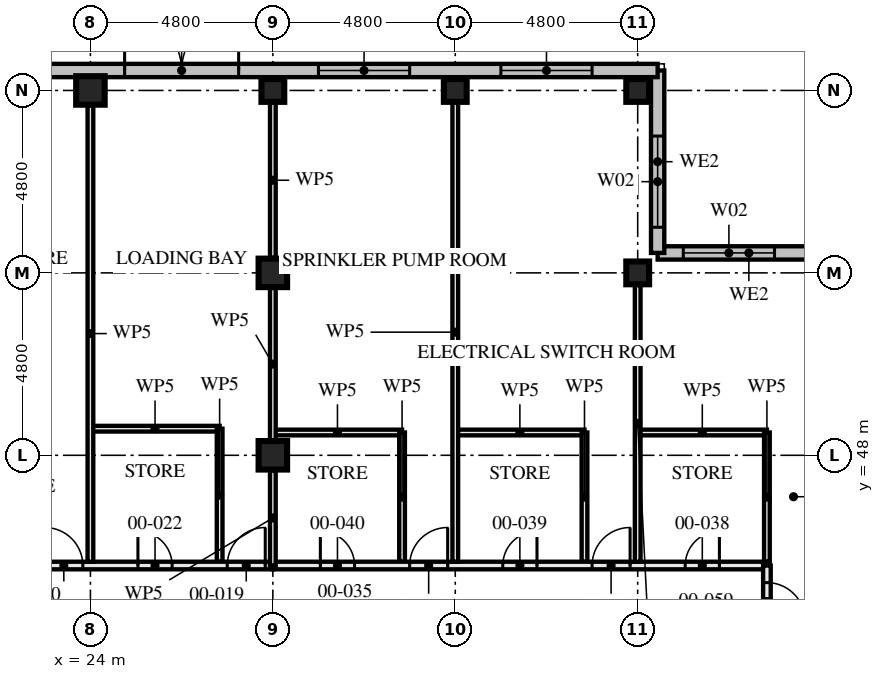
"""IFC4 building model, lengths in metres.
Left out: names, types, materials, properties, quantities, classifications, styles, units other than length and angle.
Written with IfcOpenShell. Run it as: python <this file> out.ifc"""

import sys

from ifc_helpers import new_model, si_unit, direction, frame, frame_2d, origin, origin_2d, place, context, subcontext, project, spatial, rectangle, hollow_rectangle, extrude, element, fill, save


model = new_model("IFC4")
c1 = context("Model", 3, precision=1e-05, world=origin(), true_north=direction((0.0, 1.0)))
c2 = subcontext(c1, "Body", "Model", "MODEL_VIEW")
j1 = project(units=[si_unit("LENGTHUNIT", "METRE"), si_unit("PLANEANGLEUNIT", "RADIAN")], contexts=[c1])
p1 = place(None, origin())
s1 = spatial("IfcSite", under=j1, at=p1, CompositionType="ELEMENT")
p2 = place(p1, origin())
s2 = spatial("IfcBuilding", under=s1, at=p2, CompositionType="ELEMENT")
p3 = place(p2, origin())
s3 = spatial("IfcBuildingStorey", under=s2, at=p3, CompositionType="ELEMENT", Elevation=0.0)
for number, where, z_axis, x_axis in (
    (1, (24.0, 57.6, 0.0), (0.0, 0.0, 1.0), (0.0, 1.0, 0.0)),
    (2, (28.8, 48.0, 0.0), (0.0, 0.0, 1.0), (1.0, 0.0, 0.0)),
    (3, (28.8, 52.8, 0.0), (0.0, 0.0, 1.0), (1.0, 0.0, 0.0)),
):
    element("IfcColumn", number, at=place(p3, frame(where, z_axis=z_axis, x_axis=x_axis)), inside=s3, PredefinedType="COLUMN", context=c2, shape_type="SweptSolid", body=[
        extrude(hollow_rectangle(XDim=0.75, YDim=0.75, WallThickness=0.08, at=origin_2d()), origin(), (0.0, 0.0, 1.0), 4.5),
    ])
for number, where, z_axis, x_axis in (
    (4, (28.8, 57.6, 0.0), (0.0, 0.0, 1.0), (0.0, 1.0, 0.0)),
    (5, (33.6, 57.6, 0.0), (0.0, 0.0, 1.0), (0.0, 1.0, 0.0)),
):
    element("IfcColumn", number, at=place(p3, frame(where, z_axis=z_axis, x_axis=x_axis)), inside=s3, PredefinedType="COLUMN", context=c2, shape_type="SweptSolid", body=[
        extrude(hollow_rectangle(XDim=0.6, YDim=0.6, WallThickness=0.08, at=origin_2d()), origin(), (0.0, 0.0, 1.0), 4.5),
    ])
for number, where, z_axis, x_axis in (
    (6, (38.4, 52.8, 0.0), (0.0, 0.0, 1.0), (0.0, 1.0, 0.0)),
    (7, (38.4, 57.6, 0.0), (0.0, 0.0, 1.0), (0.0, 1.0, 0.0)),
):
    element("IfcColumn", number, at=place(p3, frame(where, z_axis=z_axis, x_axis=x_axis)), inside=s3, PredefinedType="COLUMN", context=c2, shape_type="SweptSolid", body=[
        extrude(hollow_rectangle(XDim=0.6, YDim=0.6, WallThickness=0.06, at=origin_2d()), origin(), (0.0, 0.0, 1.0), 4.5),
    ])
p4 = place(p3, frame((43.725, 53.325, 0.0), z_axis=(0.0, 0.0, 1.0), x_axis=(-1.0, 0.0, 0.0)))
e8 = element("IfcWall", 8, at=p4, inside=s3, PredefinedType="SOLIDWALL", context=c2, shape_type="SweptSolid", body=[
    extrude(rectangle(XDim=4.8, YDim=0.35, at=frame_2d((2.4, 0.0))), origin(), (0.0, 0.0, 1.0), 4.5),
])
p5 = place(p4, frame((1.725, 0.0, 0.9)))
e9 = element("IfcOpeningElement", 9, at=p5, cuts=e8, PredefinedType="OPENING", context=c2, shape_type="SweptSolid", body=[
    extrude(rectangle(XDim=2.4, YDim=2.4, at=frame_2d((1.2, 1.2))), frame((0.0, 0.186, 0.0), z_axis=(0.0, -1.0, 0.0), x_axis=(1.0, 0.0, 0.0)), (0.0, 0.0, 1.0), 0.371),
])
p6 = place(p3, frame((38.925, 53.325, 0.0), z_axis=(0.0, 0.0, 1.0), x_axis=(0.0, 1.0, 0.0)))
e10 = element("IfcWall", 10, at=p6, inside=s3, PredefinedType="SOLIDWALL", context=c2, shape_type="SweptSolid", body=[
    extrude(rectangle(XDim=4.8, YDim=0.35, at=frame_2d((2.4, 0.0))), origin(), (0.0, 0.0, 1.0), 4.5),
])
p7 = place(p6, frame((0.675, 0.0, 0.9)))
e11 = element("IfcOpeningElement", 11, at=p7, cuts=e10, PredefinedType="OPENING", context=c2, shape_type="SweptSolid", body=[
    extrude(rectangle(XDim=2.4, YDim=2.4, at=frame_2d((1.2, 1.2))), frame((0.0, 0.186, 0.0), z_axis=(0.0, -1.0, 0.0), x_axis=(1.0, 0.0, 0.0)), (0.0, 0.0, 1.0), 0.371),
])
p8 = place(p3, frame((38.925, 58.125, 0.0), z_axis=(0.0, 0.0, 1.0), x_axis=(-1.0, 0.0, 0.0)))
e12 = element("IfcWall", 12, at=p8, inside=s3, PredefinedType="SOLIDWALL", context=c2, shape_type="SweptSolid", body=[
    extrude(rectangle(XDim=34.65, YDim=0.35, at=frame_2d((17.325, 0.0))), origin(), (0.0, 0.0, 1.0), 4.5),
])
p9 = place(p8, frame((11.025, 0.0, 0.0)))
e13 = element("IfcOpeningElement", 13, at=p9, cuts=e12, PredefinedType="OPENING", context=c2, shape_type="SweptSolid", body=[
    extrude(rectangle(XDim=3.0, YDim=3.6, at=frame_2d((1.5, 1.8))), frame((0.0, 0.186, 0.0), z_axis=(0.0, -1.0, 0.0), x_axis=(1.0, 0.0, 0.0)), (0.0, 0.0, 1.0), 0.371),
])
p10 = place(p8, frame((30.525, 0.0, 0.9)))
e14 = element("IfcOpeningElement", 14, at=p10, cuts=e12, PredefinedType="OPENING", context=c2, shape_type="SweptSolid", body=[
    extrude(rectangle(XDim=2.4, YDim=2.4, at=frame_2d((1.2, 1.2))), frame((0.0, 0.186, 0.0), z_axis=(0.0, -1.0, 0.0), x_axis=(1.0, 0.0, 0.0)), (0.0, 0.0, 1.0), 0.371),
])
p11 = place(p8, frame((25.725, 0.0, 0.9)))
e15 = element("IfcOpeningElement", 15, at=p11, cuts=e12, PredefinedType="OPENING", context=c2, shape_type="SweptSolid", body=[
    extrude(rectangle(XDim=2.4, YDim=2.4, at=frame_2d((1.2, 1.2))), frame((0.0, 0.186, 0.0), z_axis=(0.0, -1.0, 0.0), x_axis=(1.0, 0.0, 0.0)), (0.0, 0.0, 1.0), 0.371),
])
p12 = place(p8, frame((20.925, 0.0, 0.9)))
e16 = element("IfcOpeningElement", 16, at=p12, cuts=e12, PredefinedType="OPENING", context=c2, shape_type="SweptSolid", body=[
    extrude(rectangle(XDim=2.4, YDim=2.4, at=frame_2d((1.2, 1.2))), frame((0.0, 0.186, 0.0), z_axis=(0.0, -1.0, 0.0), x_axis=(1.0, 0.0, 0.0)), (0.0, 0.0, 1.0), 0.371),
])
p13 = place(p8, frame((16.125, 0.0, 0.9)))
e17 = element("IfcOpeningElement", 17, at=p13, cuts=e12, PredefinedType="OPENING", context=c2, shape_type="SweptSolid", body=[
    extrude(rectangle(XDim=2.4, YDim=2.4, at=frame_2d((1.2, 1.2))), frame((0.0, 0.186, 0.0), z_axis=(0.0, -1.0, 0.0), x_axis=(1.0, 0.0, 0.0)), (0.0, 0.0, 1.0), 0.371),
])
p14 = place(p8, frame((6.525, 0.0, 0.9)))
e18 = element("IfcOpeningElement", 18, at=p14, cuts=e12, PredefinedType="OPENING", context=c2, shape_type="SweptSolid", body=[
    extrude(rectangle(XDim=2.4, YDim=2.4, at=frame_2d((1.2, 1.2))), frame((0.0, 0.186, 0.0), z_axis=(0.0, -1.0, 0.0), x_axis=(1.0, 0.0, 0.0)), (0.0, 0.0, 1.0), 0.371),
])
p15 = place(p8, frame((1.725, 0.0, 0.9)))
e19 = element("IfcOpeningElement", 19, at=p15, cuts=e12, PredefinedType="OPENING", context=c2, shape_type="SweptSolid", body=[
    extrude(rectangle(XDim=2.4, YDim=2.4, at=frame_2d((1.2, 1.2))), frame((0.0, 0.186, 0.0), z_axis=(0.0, -1.0, 0.0), x_axis=(1.0, 0.0, 0.0)), (0.0, 0.0, 1.0), 0.371),
])
p16 = place(p3, frame((27.4, 48.7, 0.0), z_axis=(0.0, 0.0, 1.0), x_axis=(0.0, -1.0, 0.0)))
e20 = element("IfcWall", 20, at=p16, inside=s3, PredefinedType="PARTITIONING", context=c2, shape_type="SweptSolid", body=[
    extrude(rectangle(XDim=3.5, YDim=0.15, at=frame_2d((1.75, 0.0))), origin(), (0.0, 0.0, 1.0), 3.55),
])
p17 = place(p3, frame((27.4, 48.7, 0.0), z_axis=(0.0, 0.0, 1.0), x_axis=(-1.0, 0.0, 0.0)))
e21 = element("IfcWall", 21, at=p17, inside=s3, PredefinedType="PARTITIONING", context=c2, shape_type="SweptSolid", body=[
    extrude(rectangle(XDim=3.4, YDim=0.15, at=frame_2d((1.7, 0.0))), origin(), (0.0, 0.0, 1.0), 4.33),
])
p18 = place(p3, frame((24.0, 57.205, 0.0), z_axis=(0.0, 0.0, 1.0), x_axis=(0.0, -1.0, 0.0)))
e22 = element("IfcWall", 22, at=p18, inside=s3, PredefinedType="PARTITIONING", context=c2, shape_type="SweptSolid", body=[
    extrude(rectangle(XDim=12.005, YDim=0.15, at=frame_2d((6.002, 0.0))), origin(), (0.0, 0.0, 1.0), 3.55),
])
p19 = place(p3, frame((28.8, 45.1, 0.0), z_axis=(0.0, 0.0, 1.0), x_axis=(-1.0, 0.0, 0.0)))
e23 = element("IfcWall", 23, at=p19, inside=s3, PredefinedType="PARTITIONING", context=c2, shape_type="SweptSolid", body=[
    extrude(rectangle(XDim=14.4, YDim=0.2, at=frame_2d((7.2, 0.0))), origin(), (0.0, 0.0, 1.0), 4.33),
])
p20 = place(p19, frame((0.2, 0.0, 0.0)))
e24 = element("IfcOpeningElement", 24, at=p20, cuts=e23, PredefinedType="OPENING", context=c2, shape_type="SweptSolid", body=[
    extrude(rectangle(XDim=1.0, YDim=2.4, at=frame_2d((0.5, 1.2))), frame((0.0, 0.111, 0.0), z_axis=(0.0, -1.0, 0.0), x_axis=(1.0, 0.0, 0.0)), (0.0, 0.0, 1.0), 0.221),
])
p21 = place(p19, frame((5.0, 0.0, 0.0)))
e25 = element("IfcOpeningElement", 25, at=p21, cuts=e23, PredefinedType="OPENING", context=c2, shape_type="SweptSolid", body=[
    extrude(rectangle(XDim=1.0, YDim=2.4, at=frame_2d((0.5, 1.2))), frame((0.0, 0.111, 0.0), z_axis=(0.0, -1.0, 0.0), x_axis=(1.0, 0.0, 0.0)), (0.0, 0.0, 1.0), 0.221),
])
p22 = place(p19, frame((9.8, 0.0, 0.0)))
e26 = element("IfcOpeningElement", 26, at=p22, cuts=e23, PredefinedType="OPENING", context=c2, shape_type="SweptSolid", body=[
    extrude(rectangle(XDim=1.0, YDim=2.4, at=frame_2d((0.5, 1.2))), frame((0.0, 0.111, 0.0), z_axis=(0.0, -1.0, 0.0), x_axis=(1.0, 0.0, 0.0)), (0.0, 0.0, 1.0), 0.221),
])
p23 = place(p19, frame((2.65, 0.0, 0.0)))
e27 = element("IfcOpeningElement", 27, at=p23, cuts=e23, PredefinedType="OPENING", context=c2, shape_type="SweptSolid", body=[
    extrude(rectangle(XDim=0.9, YDim=2.1, at=frame_2d((0.45, 1.05))), frame((0.0, 0.111, 0.0), z_axis=(0.0, -1.0, 0.0), x_axis=(1.0, 0.0, 0.0)), (0.0, 0.0, 1.0), 0.221),
])
p24 = place(p19, frame((7.45, 0.0, 0.0)))
e28 = element("IfcOpeningElement", 28, at=p24, cuts=e23, PredefinedType="OPENING", context=c2, shape_type="SweptSolid", body=[
    extrude(rectangle(XDim=0.9, YDim=2.1, at=frame_2d((0.45, 1.05))), frame((0.0, 0.111, 0.0), z_axis=(0.0, -1.0, 0.0), x_axis=(1.0, 0.0, 0.0)), (0.0, 0.0, 1.0), 0.221),
])
p25 = place(p19, frame((12.25, 0.0, 0.0)))
e29 = element("IfcOpeningElement", 29, at=p25, cuts=e23, PredefinedType="OPENING", context=c2, shape_type="SweptSolid", body=[
    extrude(rectangle(XDim=0.9, YDim=2.1, at=frame_2d((0.45, 1.05))), frame((0.0, 0.111, 0.0), z_axis=(0.0, -1.0, 0.0), x_axis=(1.0, 0.0, 0.0)), (0.0, 0.0, 1.0), 0.221),
])
p26 = place(p3, frame((41.8, 48.6, 0.0), z_axis=(0.0, 0.0, 1.0), x_axis=(0.0, -1.0, 0.0)))
e30 = element("IfcWall", 30, at=p26, inside=s3, PredefinedType="PARTITIONING", context=c2, shape_type="SweptSolid", body=[
    extrude(rectangle(XDim=3.4, YDim=0.15, at=frame_2d((1.7, 0.0))), origin(), (0.0, 0.0, 1.0), 3.55),
])
p27 = place(p3, frame((41.8, 48.6, 0.0), z_axis=(0.0, 0.0, 1.0), x_axis=(-1.0, 0.0, 0.0)))
e31 = element("IfcWall", 31, at=p27, inside=s3, PredefinedType="PARTITIONING", context=c2, shape_type="SweptSolid", body=[
    extrude(rectangle(XDim=3.4, YDim=0.15, at=frame_2d((1.7, 0.0))), origin(), (0.0, 0.0, 1.0), 4.33),
])
p28 = place(p3, frame((37.0, 48.6, 0.0), z_axis=(0.0, 0.0, 1.0), x_axis=(0.0, -1.0, 0.0)))
e32 = element("IfcWall", 32, at=p28, inside=s3, PredefinedType="PARTITIONING", context=c2, shape_type="SweptSolid", body=[
    extrude(rectangle(XDim=3.4, YDim=0.15, at=frame_2d((1.7, 0.0))), origin(), (0.0, 0.0, 1.0), 3.55),
])
p29 = place(p3, frame((37.0, 48.6, 0.0), z_axis=(0.0, 0.0, 1.0), x_axis=(-1.0, 0.0, 0.0)))
e33 = element("IfcWall", 33, at=p29, inside=s3, PredefinedType="PARTITIONING", context=c2, shape_type="SweptSolid", body=[
    extrude(rectangle(XDim=3.4, YDim=0.15, at=frame_2d((1.7, 0.0))), origin(), (0.0, 0.0, 1.0), 4.33),
])
p30 = place(p3, frame((32.2, 48.6, 0.0), z_axis=(0.0, 0.0, 1.0), x_axis=(0.0, -1.0, 0.0)))
e34 = element("IfcWall", 34, at=p30, inside=s3, PredefinedType="PARTITIONING", context=c2, shape_type="SweptSolid", body=[
    extrude(rectangle(XDim=3.4, YDim=0.15, at=frame_2d((1.7, 0.0))), origin(), (0.0, 0.0, 1.0), 3.55),
])
p31 = place(p3, frame((32.2, 48.6, 0.0), z_axis=(0.0, 0.0, 1.0), x_axis=(-1.0, 0.0, 0.0)))
e35 = element("IfcWall", 35, at=p31, inside=s3, PredefinedType="PARTITIONING", context=c2, shape_type="SweptSolid", body=[
    extrude(rectangle(XDim=3.4, YDim=0.15, at=frame_2d((1.7, 0.0))), origin(), (0.0, 0.0, 1.0), 4.33),
])
p32 = place(p3, frame((38.4, 52.48, 0.0), z_axis=(0.0, 0.0, 1.0), x_axis=(0.0, -1.0, 0.0)))
e36 = element("IfcWall", 36, at=p32, inside=s3, PredefinedType="PARTITIONING", context=c2, shape_type="SweptSolid", body=[
    extrude(rectangle(XDim=7.28, YDim=0.15, at=frame_2d((3.64, 0.0))), origin(), (0.0, 0.0, 1.0), 3.55),
])
p33 = place(p3, frame((33.6, 57.28, 0.0), z_axis=(0.0, 0.0, 1.0), x_axis=(0.0, -1.0, 0.0)))
e37 = element("IfcWall", 37, at=p33, inside=s3, PredefinedType="PARTITIONING", context=c2, shape_type="SweptSolid", body=[
    extrude(rectangle(XDim=12.08, YDim=0.15, at=frame_2d((6.04, 0.0))), origin(), (0.0, 0.0, 1.0), 3.55),
])
p34 = place(p3, frame((41.8, 45.1, 0.0), z_axis=(0.0, 0.0, 1.0), x_axis=(-1.0, 0.0, 0.0)))
e38 = element("IfcWall", 38, at=p34, inside=s3, PredefinedType="PARTITIONING", context=c2, shape_type="SweptSolid", body=[
    extrude(rectangle(XDim=13.0, YDim=0.2, at=frame_2d((6.5, 0.0))), origin(), (0.0, 0.0, 1.0), 4.33),
])
p35 = place(p34, frame((3.6, 0.0, 0.0)))
e39 = element("IfcOpeningElement", 39, at=p35, cuts=e38, PredefinedType="OPENING", context=c2, shape_type="SweptSolid", body=[
    extrude(rectangle(XDim=1.0, YDim=2.4, at=frame_2d((0.5, 1.2))), frame((0.0, 0.111, 0.0), z_axis=(0.0, -1.0, 0.0), x_axis=(1.0, 0.0, 0.0)), (0.0, 0.0, 1.0), 0.221),
])
p36 = place(p34, frame((8.4, 0.0, 0.0)))
e40 = element("IfcOpeningElement", 40, at=p36, cuts=e38, PredefinedType="OPENING", context=c2, shape_type="SweptSolid", body=[
    extrude(rectangle(XDim=1.0, YDim=2.4, at=frame_2d((0.5, 1.2))), frame((0.0, 0.111, 0.0), z_axis=(0.0, -1.0, 0.0), x_axis=(1.0, 0.0, 0.0)), (0.0, 0.0, 1.0), 0.221),
])
p37 = place(p34, frame((1.25, 0.0, 0.0)))
e41 = element("IfcOpeningElement", 41, at=p37, cuts=e38, PredefinedType="OPENING", context=c2, shape_type="SweptSolid", body=[
    extrude(rectangle(XDim=0.9, YDim=2.1, at=frame_2d((0.45, 1.05))), frame((0.0, 0.111, 0.0), z_axis=(0.0, -1.0, 0.0), x_axis=(1.0, 0.0, 0.0)), (0.0, 0.0, 1.0), 0.221),
])
p38 = place(p34, frame((6.05, 0.0, 0.0)))
e42 = element("IfcOpeningElement", 42, at=p38, cuts=e38, PredefinedType="OPENING", context=c2, shape_type="SweptSolid", body=[
    extrude(rectangle(XDim=0.9, YDim=2.1, at=frame_2d((0.45, 1.05))), frame((0.0, 0.111, 0.0), z_axis=(0.0, -1.0, 0.0), x_axis=(1.0, 0.0, 0.0)), (0.0, 0.0, 1.0), 0.221),
])
p39 = place(p34, frame((10.85, 0.0, 0.0)))
e43 = element("IfcOpeningElement", 43, at=p39, cuts=e38, PredefinedType="OPENING", context=c2, shape_type="SweptSolid", body=[
    extrude(rectangle(XDim=0.9, YDim=2.1, at=frame_2d((0.45, 1.05))), frame((0.0, 0.111, 0.0), z_axis=(0.0, -1.0, 0.0), x_axis=(1.0, 0.0, 0.0)), (0.0, 0.0, 1.0), 0.221),
])
p40 = place(p3, frame((28.8, 45.1, 0.0), z_axis=(0.0, 0.0, 1.0), x_axis=(0.0, 1.0, 0.0)))
e44 = element("IfcWall", 44, at=p40, inside=s3, PredefinedType="PARTITIONING", context=c2, shape_type="SweptSolid", body=[
    extrude(rectangle(XDim=2.505, YDim=0.15, at=frame_2d((1.252, 0.0))), origin(), (0.0, 0.0, 1.0), 3.32),
])
p41 = place(p3, frame((28.8, 48.395, 0.0), z_axis=(0.0, 0.0, 1.0), x_axis=(0.0, 1.0, 0.0)))
e45 = element("IfcWall", 45, at=p41, inside=s3, PredefinedType="PARTITIONING", context=c2, shape_type="SweptSolid", body=[
    extrude(rectangle(XDim=4.01, YDim=0.15, at=frame_2d((2.005, 0.0))), origin(), (0.0, 0.0, 1.0), 3.32),
])
p42 = place(p3, frame((28.8, 53.195, 0.0), z_axis=(0.0, 0.0, 1.0), x_axis=(0.0, 1.0, 0.0)))
e46 = element("IfcWall", 46, at=p42, inside=s3, PredefinedType="PARTITIONING", context=c2, shape_type="SweptSolid", body=[
    extrude(rectangle(XDim=4.085, YDim=0.15, at=frame_2d((2.042, 0.0))), origin(), (0.0, 0.0, 1.0), 3.32),
])
p43 = place(p3, frame((41.8, 45.1, 0.0), z_axis=(0.0, 0.0, 1.0), x_axis=(0.0, -1.0, 0.0)))
e47 = element("IfcWall", 47, at=p43, inside=s3, PredefinedType="PARTITIONING", context=c2, shape_type="SweptSolid", body=[
    extrude(rectangle(XDim=1.9, YDim=0.2, at=frame_2d((0.95, 0.0))), origin(), (0.0, 0.0, 1.0), 4.33),
])
p44 = place(p43, frame((0.45, 0.0, 0.0)))
e48 = element("IfcOpeningElement", 48, at=p44, cuts=e47, PredefinedType="OPENING", context=c2, shape_type="SweptSolid", body=[
    extrude(rectangle(XDim=1.0, YDim=2.4, at=frame_2d((0.5, 1.2))), frame((0.0, 0.111, 0.0), z_axis=(0.0, -1.0, 0.0), x_axis=(1.0, 0.0, 0.0)), (0.0, 0.0, 1.0), 0.221),
])
p45 = place(p5, origin())
e49 = element("IfcWindow", 49, at=p45, inside=s3, PartitioningType="SINGLE_PANEL", PredefinedType="WINDOW", context=c2, shape_type="SweptSolid", body=[
    extrude(rectangle(XDim=2.4, YDim=2.4, at=frame_2d((1.2, 1.2))), frame((0.0, 0.03, 0.0), z_axis=(0.0, -1.0, 0.0), x_axis=(1.0, 0.0, 0.0)), (0.0, 0.0, 1.0), 0.06),
])
fill(e9, e49)
p46 = place(p7, origin())
e50 = element("IfcWindow", 50, at=p46, inside=s3, PartitioningType="SINGLE_PANEL", PredefinedType="WINDOW", context=c2, shape_type="SweptSolid", body=[
    extrude(rectangle(XDim=2.4, YDim=2.4, at=frame_2d((1.2, 1.2))), frame((0.0, 0.03, 0.0), z_axis=(0.0, -1.0, 0.0), x_axis=(1.0, 0.0, 0.0)), (0.0, 0.0, 1.0), 0.06),
])
fill(e11, e50)
p47 = place(p9, frame((3.0, 0.0, 0.0), z_axis=(0.0, 0.0, 1.0), x_axis=(-1.0, 0.0, 0.0)))
e51 = element("IfcDoor", 51, at=p47, inside=s3, OperationType="DOUBLE_DOOR_SINGLE_SWING", PredefinedType="DOOR", context=c2, shape_type="SweptSolid", body=[
    extrude(rectangle(XDim=3.0, YDim=3.6, at=frame_2d((1.5, 1.8))), frame((0.0, 0.035, 0.0), z_axis=(0.0, -1.0, 0.0), x_axis=(1.0, 0.0, 0.0)), (0.0, 0.0, 1.0), 0.07),
])
fill(e13, e51)
p48 = place(p14, origin())
e52 = element("IfcWindow", 52, at=p48, inside=s3, PartitioningType="SINGLE_PANEL", PredefinedType="WINDOW", context=c2, shape_type="SweptSolid", body=[
    extrude(rectangle(XDim=2.4, YDim=2.4, at=frame_2d((1.2, 1.2))), frame((0.0, 0.03, 0.0), z_axis=(0.0, -1.0, 0.0), x_axis=(1.0, 0.0, 0.0)), (0.0, 0.0, 1.0), 0.06),
])
fill(e18, e52)
p49 = place(p15, origin())
e53 = element("IfcWindow", 53, at=p49, inside=s3, PartitioningType="SINGLE_PANEL", PredefinedType="WINDOW", context=c2, shape_type="SweptSolid", body=[
    extrude(rectangle(XDim=2.4, YDim=2.4, at=frame_2d((1.2, 1.2))), frame((0.0, 0.03, 0.0), z_axis=(0.0, -1.0, 0.0), x_axis=(1.0, 0.0, 0.0)), (0.0, 0.0, 1.0), 0.06),
])
fill(e19, e53)
p50 = place(p20, frame((1.0, 0.0, 0.0), z_axis=(0.0, 0.0, 1.0), x_axis=(-1.0, 0.0, 0.0)))
e54 = element("IfcDoor", 54, at=p50, inside=s3, OperationType="SINGLE_SWING_LEFT", PredefinedType="DOOR", context=c2, shape_type="SweptSolid", body=[
    extrude(rectangle(XDim=1.0, YDim=2.4, at=frame_2d((0.5, 1.2))), frame((0.0, 0.027, 0.0), z_axis=(0.0, -1.0, 0.0), x_axis=(1.0, 0.0, 0.0)), (0.0, 0.0, 1.0), 0.054),
])
fill(e24, e54)
p51 = place(p21, frame((1.0, 0.0, 0.0), z_axis=(0.0, 0.0, 1.0), x_axis=(-1.0, 0.0, 0.0)))
e55 = element("IfcDoor", 55, at=p51, inside=s3, OperationType="SINGLE_SWING_RIGHT", PredefinedType="DOOR", context=c2, shape_type="SweptSolid", body=[
    extrude(rectangle(XDim=1.0, YDim=2.4, at=frame_2d((0.5, 1.2))), frame((0.0, 0.027, 0.0), z_axis=(0.0, -1.0, 0.0), x_axis=(1.0, 0.0, 0.0)), (0.0, 0.0, 1.0), 0.054),
])
fill(e25, e55)
p52 = place(p23, frame((0.9, 0.0, 0.0), z_axis=(0.0, 0.0, 1.0), x_axis=(-1.0, 0.0, 0.0)))
e56 = element("IfcDoor", 56, at=p52, inside=s3, OperationType="SINGLE_SWING_RIGHT", PredefinedType="DOOR", context=c2, shape_type="SweptSolid", body=[
    extrude(rectangle(XDim=0.9, YDim=2.1, at=frame_2d((0.45, 1.05))), frame((0.0, 0.027, 0.0), z_axis=(0.0, -1.0, 0.0), x_axis=(1.0, 0.0, 0.0)), (0.0, 0.0, 1.0), 0.054),
])
fill(e27, e56)
p53 = place(p35, frame((1.0, 0.0, 0.0), z_axis=(0.0, 0.0, 1.0), x_axis=(-1.0, 0.0, 0.0)))
e57 = element("IfcDoor", 57, at=p53, inside=s3, OperationType="SINGLE_SWING_LEFT", PredefinedType="DOOR", context=c2, shape_type="SweptSolid", body=[
    extrude(rectangle(XDim=1.0, YDim=2.4, at=frame_2d((0.5, 1.2))), frame((0.0, 0.027, 0.0), z_axis=(0.0, -1.0, 0.0), x_axis=(1.0, 0.0, 0.0)), (0.0, 0.0, 1.0), 0.054),
])
fill(e39, e57)
p54 = place(p36, frame((1.0, 0.0, 0.0), z_axis=(0.0, 0.0, 1.0), x_axis=(-1.0, 0.0, 0.0)))
e58 = element("IfcDoor", 58, at=p54, inside=s3, OperationType="SINGLE_SWING_LEFT", PredefinedType="DOOR", context=c2, shape_type="SweptSolid", body=[
    extrude(rectangle(XDim=1.0, YDim=2.4, at=frame_2d((0.5, 1.2))), frame((0.0, 0.027, 0.0), z_axis=(0.0, -1.0, 0.0), x_axis=(1.0, 0.0, 0.0)), (0.0, 0.0, 1.0), 0.054),
])
fill(e40, e58)
p55 = place(p37, frame((0.9, 0.0, 0.0), z_axis=(0.0, 0.0, 1.0), x_axis=(-1.0, 0.0, 0.0)))
e59 = element("IfcDoor", 59, at=p55, inside=s3, OperationType="SINGLE_SWING_LEFT", PredefinedType="DOOR", context=c2, shape_type="SweptSolid", body=[
    extrude(rectangle(XDim=0.9, YDim=2.1, at=frame_2d((0.45, 1.05))), frame((0.0, 0.027, 0.0), z_axis=(0.0, -1.0, 0.0), x_axis=(1.0, 0.0, 0.0)), (0.0, 0.0, 1.0), 0.054),
])
fill(e41, e59)
p56 = place(p38, frame((0.9, 0.0, 0.0), z_axis=(0.0, 0.0, 1.0), x_axis=(-1.0, 0.0, 0.0)))
e60 = element("IfcDoor", 60, at=p56, inside=s3, OperationType="SINGLE_SWING_LEFT", PredefinedType="DOOR", context=c2, shape_type="SweptSolid", body=[
    extrude(rectangle(XDim=0.9, YDim=2.1, at=frame_2d((0.45, 1.05))), frame((0.0, 0.027, 0.0), z_axis=(0.0, -1.0, 0.0), x_axis=(1.0, 0.0, 0.0)), (0.0, 0.0, 1.0), 0.054),
])
fill(e42, e60)
p57 = place(p39, frame((0.9, 0.0, 0.0), z_axis=(0.0, 0.0, 1.0), x_axis=(-1.0, 0.0, 0.0)))
e61 = element("IfcDoor", 61, at=p57, inside=s3, OperationType="SINGLE_SWING_RIGHT", PredefinedType="DOOR", context=c2, shape_type="SweptSolid", body=[
    extrude(rectangle(XDim=0.9, YDim=2.1, at=frame_2d((0.45, 1.05))), frame((0.0, 0.027, 0.0), z_axis=(0.0, -1.0, 0.0), x_axis=(1.0, 0.0, 0.0)), (0.0, 0.0, 1.0), 0.054),
])
fill(e43, e61)
p58 = place(p44, origin())
e62 = element("IfcDoor", 62, at=p58, inside=s3, OperationType="SINGLE_SWING_LEFT", PredefinedType="DOOR", context=c2, shape_type="SweptSolid", body=[
    extrude(rectangle(XDim=1.0, YDim=2.4, at=frame_2d((0.5, 1.2))), frame((0.0, 0.027, 0.0), z_axis=(0.0, -1.0, 0.0), x_axis=(1.0, 0.0, 0.0)), (0.0, 0.0, 1.0), 0.054),
])
fill(e48, e62)
save(model, sys.argv[1])
